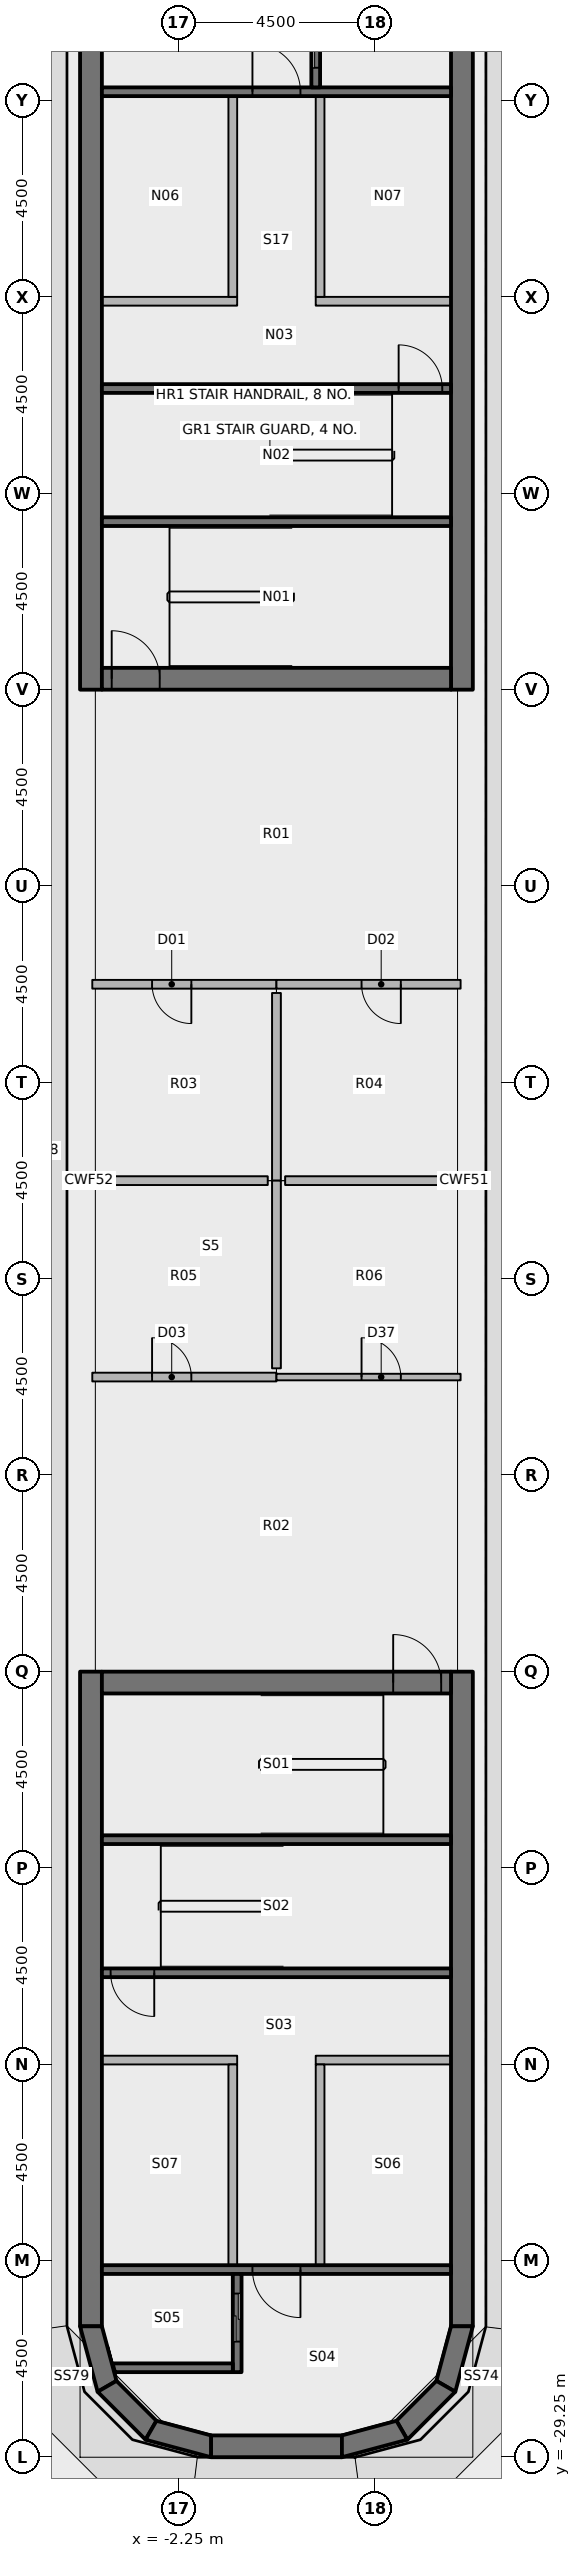
"""IFC4 building model, lengths in metres.
Left out: names, types, materials, properties, quantities, classifications, styles, units other than length and angle.
Written with IfcOpenShell. Run it as: python <this file> out.ifc"""

import sys

from ifc_helpers import new_model, si_unit, direction, frame, frame_2d, origin, place, context, subcontext, project, spatial, polyline, rectangle, outline, extrude, element, fill, save


model = new_model("IFC4")
c1 = context("Model", 3, precision=1e-05, world=origin(), true_north=direction((0.0, 1.0)))
c2 = subcontext(c1, "Body", "Model", "MODEL_VIEW")
j1 = project(units=[si_unit("LENGTHUNIT", "METRE"), si_unit("PLANEANGLEUNIT", "RADIAN")], contexts=[c1])
p1 = place(None, origin())
s1 = spatial("IfcSite", under=j1, at=p1, CompositionType="ELEMENT")
p2 = place(p1, origin())
s2 = spatial("IfcBuilding", under=s1, at=p2, CompositionType="ELEMENT")
p3 = place(p2, frame((0.0, 0.0, 313.2)))
s3 = spatial("IfcBuildingStorey", under=s2, at=p3, CompositionType="ELEMENT", Elevation=313.2)
for number, where, z_axis, x_axis in (
    (1, (-4.25, 11.25, 0.0), (0.0, 0.0, 1.0), (0.0, 1.0, 0.0)),
    (2, (4.25, 11.25, 0.0), (0.0, 0.0, 1.0), (0.0, 1.0, 0.0)),
):
    element("IfcWall", number, at=place(p3, frame(where, z_axis=z_axis, x_axis=x_axis)), inside=s3, PredefinedType="SHEAR", context=c2, shape_type="SweptSolid", body=[
        extrude(rectangle(XDim=15.0, YDim=0.5, at=frame_2d((7.5, 0.0))), origin(), (0.0, 0.0, 1.0), 3.6),
    ])
p4 = place(p3, frame((-4.0, 11.5, 0.0), z_axis=(0.0, 0.0, 1.0), x_axis=(1.0, 0.0, 0.0)))
e3 = element("IfcWall", 3, at=p4, inside=s3, PredefinedType="SHEAR", context=c2, shape_type="SweptSolid", body=[
    extrude(rectangle(XDim=8.0, YDim=0.5, at=frame_2d((4.0, 0.0))), origin(), (0.0, 0.0, 1.0), 3.6),
])
p5 = place(p4, frame((0.225, 0.0, 0.0)))
e4 = element("IfcOpeningElement", 4, at=p5, cuts=e3, PredefinedType="OPENING", context=c2, shape_type="SweptSolid", body=[
    extrude(rectangle(XDim=1.1, YDim=2.1, at=frame_2d((0.55, 1.05))), frame((0.0, 0.26, 0.0), z_axis=(0.0, -1.0, 0.0), x_axis=(1.0, 0.0, 0.0)), (0.0, 0.0, 1.0), 0.52),
])
for number, where, z_axis, x_axis in (
    (5, (-4.25, -11.25, 0.0), (0.0, 0.0, 1.0), (0.0, -1.0, 0.0)),
    (6, (4.25, -11.25, 0.0), (0.0, 0.0, 1.0), (0.0, -1.0, 0.0)),
):
    element("IfcWall", number, at=place(p3, frame(where, z_axis=z_axis, x_axis=x_axis)), inside=s3, PredefinedType="SHEAR", context=c2, shape_type="SweptSolid", body=[
        extrude(rectangle(XDim=15.0, YDim=0.5, at=frame_2d((7.5, 0.0))), origin(), (0.0, 0.0, 1.0), 3.6),
    ])
p6 = place(p3, frame((-4.0, -11.5, 0.0), z_axis=(0.0, 0.0, 1.0), x_axis=(1.0, 0.0, 0.0)))
e7 = element("IfcWall", 7, at=p6, inside=s3, PredefinedType="SHEAR", context=c2, shape_type="SweptSolid", body=[
    extrude(rectangle(XDim=8.0, YDim=0.5, at=frame_2d((4.0, 0.0))), origin(), (0.0, 0.0, 1.0), 3.6),
])
p7 = place(p6, frame((6.675, 0.0, 0.0)))
e8 = element("IfcOpeningElement", 8, at=p7, cuts=e7, PredefinedType="OPENING", context=c2, shape_type="SweptSolid", body=[
    extrude(rectangle(XDim=1.1, YDim=2.1, at=frame_2d((0.55, 1.05))), frame((0.0, 0.26, 0.0), z_axis=(0.0, -1.0, 0.0), x_axis=(1.0, 0.0, 0.0)), (0.0, 0.0, 1.0), 0.52),
])
p8 = place(p3, frame((-1.5, -29.0, 0.0), z_axis=(0.0, 0.0, 1.0), x_axis=(1.0, 0.0, 0.0)))
e9 = element("IfcWall", 9, at=p8, inside=s3, PredefinedType="SHEAR", context=c2, shape_type="SweptSolid", body=[
    extrude(rectangle(XDim=3.0, YDim=0.5, at=frame_2d((1.5, 0.0))), origin(), (0.0, 0.0, 1.0), 3.6),
])
p9 = place(p3, origin())
e10 = element("IfcWall", 10, at=p9, inside=s3, PredefinedType="SHEAR", context=c2, shape_type="SweptSolid", body=[
    extrude(outline(polyline([(-4.5, -26.25), (-4.098, -27.75), (-3.665, -27.5), (-4.0, -26.25), (-4.5, -26.25)])), origin(), (0.0, 0.0, 1.0), 3.6),
])
p10 = place(p3, origin())
e11 = element("IfcWall", 11, at=p10, inside=s3, PredefinedType="SHEAR", context=c2, shape_type="SweptSolid", body=[
    extrude(outline(polyline([(-4.098, -27.75), (-3.0, -28.848), (-2.75, -28.415), (-3.665, -27.5), (-4.098, -27.75)])), origin(), (0.0, 0.0, 1.0), 3.6),
])
p11 = place(p3, origin())
e12 = element("IfcWall", 12, at=p11, inside=s3, PredefinedType="SHEAR", context=c2, shape_type="SweptSolid", body=[
    extrude(outline(polyline([(-3.0, -28.848), (-1.5, -29.25), (-1.5, -28.75), (-2.75, -28.415), (-3.0, -28.848)])), origin(), (0.0, 0.0, 1.0), 3.6),
])
p12 = place(p3, origin())
e13 = element("IfcWall", 13, at=p12, inside=s3, PredefinedType="SHEAR", context=c2, shape_type="SweptSolid", body=[
    extrude(outline(polyline([(4.5, -26.25), (4.098, -27.75), (3.665, -27.5), (4.0, -26.25), (4.5, -26.25)])), origin(), (0.0, 0.0, 1.0), 3.6),
])
p13 = place(p3, origin())
e14 = element("IfcWall", 14, at=p13, inside=s3, PredefinedType="SHEAR", context=c2, shape_type="SweptSolid", body=[
    extrude(outline(polyline([(4.098, -27.75), (3.0, -28.848), (2.75, -28.415), (3.665, -27.5), (4.098, -27.75)])), origin(), (0.0, 0.0, 1.0), 3.6),
])
p14 = place(p3, origin())
e15 = element("IfcWall", 15, at=p14, inside=s3, PredefinedType="SHEAR", context=c2, shape_type="SweptSolid", body=[
    extrude(outline(polyline([(3.0, -28.848), (1.5, -29.25), (1.5, -28.75), (2.75, -28.415), (3.0, -28.848)])), origin(), (0.0, 0.0, 1.0), 3.6),
])
p15 = place(p3, frame((-4.0, 24.95, 0.0), z_axis=(0.0, 0.0, 1.0), x_axis=(1.0, 0.0, 0.0)))
e16 = element("IfcWall", 16, at=p15, inside=s3, PredefinedType="SHEAR", context=c2, shape_type="SweptSolid", body=[
    extrude(rectangle(XDim=8.0, YDim=0.2, at=frame_2d((4.0, 0.0))), origin(), (0.0, 0.0, 1.0), 3.45),
])
p16 = place(p15, frame((3.45, 0.0, 0.0)))
e17 = element("IfcOpeningElement", 17, at=p16, cuts=e16, PredefinedType="OPENING", context=c2, shape_type="SweptSolid", body=[
    extrude(rectangle(XDim=1.1, YDim=2.1, at=frame_2d((0.55, 1.05))), frame((0.0, 0.11, 0.0), z_axis=(0.0, -1.0, 0.0), x_axis=(1.0, 0.0, 0.0)), (0.0, 0.0, 1.0), 0.22),
])
p17 = place(p3, frame((0.9, 27.3, 0.0), z_axis=(0.0, 0.0, 1.0), x_axis=(0.0, -1.0, 0.0)))
e18 = element("IfcWall", 18, at=p17, inside=s3, PredefinedType="SHEAR", context=c2, shape_type="SweptSolid", body=[
    extrude(rectangle(XDim=2.25, YDim=0.2, at=frame_2d((1.125, 0.0))), origin(), (0.0, 0.0, 1.0), 3.45),
])
p18 = place(p17, frame((0.7, 0.0, 0.0)))
e19 = element("IfcOpeningElement", 19, at=p18, cuts=e18, PredefinedType="OPENING", context=c2, shape_type="SweptSolid", body=[
    extrude(rectangle(XDim=1.1, YDim=2.3, at=frame_2d((0.55, 1.15))), frame((0.0, 0.11, 0.0), z_axis=(0.0, -1.0, 0.0), x_axis=(1.0, 0.0, 0.0)), (0.0, 0.0, 1.0), 0.22),
])
p19 = place(p3, frame((-4.0, 18.15, 0.0), z_axis=(0.0, 0.0, 1.0), x_axis=(1.0, 0.0, 0.0)))
e20 = element("IfcWall", 20, at=p19, inside=s3, PredefinedType="SHEAR", context=c2, shape_type="SweptSolid", body=[
    extrude(rectangle(XDim=8.0, YDim=0.2, at=frame_2d((4.0, 0.0))), origin(), (0.0, 0.0, 1.0), 3.45),
])
p20 = place(p19, frame((6.8, 0.0, 0.0)))
e21 = element("IfcOpeningElement", 21, at=p20, cuts=e20, PredefinedType="OPENING", context=c2, shape_type="SweptSolid", body=[
    extrude(rectangle(XDim=1.0, YDim=2.1, at=frame_2d((0.5, 1.05))), frame((0.0, 0.11, 0.0), z_axis=(0.0, -1.0, 0.0), x_axis=(1.0, 0.0, 0.0)), (0.0, 0.0, 1.0), 0.22),
])
p21 = place(p3, frame((-4.0, 15.1, 0.0), z_axis=(0.0, 0.0, 1.0), x_axis=(1.0, 0.0, 0.0)))
e22 = element("IfcWall", 22, at=p21, inside=s3, PredefinedType="SHEAR", context=c2, shape_type="SweptSolid", body=[
    extrude(rectangle(XDim=8.0, YDim=0.2, at=frame_2d((4.0, 0.0))), origin(), (0.0, 0.0, 1.0), 3.45),
])
p22 = place(p3, frame((-4.0, 20.15, 0.0), z_axis=(0.0, 0.0, 1.0), x_axis=(1.0, 0.0, 0.0)))
e23 = element("IfcWall", 23, at=p22, inside=s3, PredefinedType="PARTITIONING", context=c2, shape_type="SweptSolid", body=[
    extrude(rectangle(XDim=3.1, YDim=0.2, at=frame_2d((1.55, 0.0))), origin(), (0.0, 0.0, 1.0), 3.45),
])
p23 = place(p3, frame((-1.0, 24.85, 0.0), z_axis=(0.0, 0.0, 1.0), x_axis=(0.0, -1.0, 0.0)))
e24 = element("IfcWall", 24, at=p23, inside=s3, PredefinedType="PARTITIONING", context=c2, shape_type="SweptSolid", body=[
    extrude(rectangle(XDim=4.6, YDim=0.2, at=frame_2d((2.3, 0.0))), origin(), (0.0, 0.0, 1.0), 3.45),
])
p24 = place(p3, frame((0.9, 20.15, 0.0), z_axis=(0.0, 0.0, 1.0), x_axis=(1.0, 0.0, 0.0)))
e25 = element("IfcWall", 25, at=p24, inside=s3, PredefinedType="PARTITIONING", context=c2, shape_type="SweptSolid", body=[
    extrude(rectangle(XDim=3.1, YDim=0.2, at=frame_2d((1.55, 0.0))), origin(), (0.0, 0.0, 1.0), 3.45),
])
p25 = place(p3, frame((1.0, 24.85, 0.0), z_axis=(0.0, 0.0, 1.0), x_axis=(0.0, -1.0, 0.0)))
e26 = element("IfcWall", 26, at=p25, inside=s3, PredefinedType="PARTITIONING", context=c2, shape_type="SweptSolid", body=[
    extrude(rectangle(XDim=4.6, YDim=0.2, at=frame_2d((2.3, 0.0))), origin(), (0.0, 0.0, 1.0), 3.45),
])
p26 = place(p3, frame((4.0, -24.95, 0.0), z_axis=(0.0, 0.0, 1.0), x_axis=(-1.0, 0.0, 0.0)))
e27 = element("IfcWall", 27, at=p26, inside=s3, PredefinedType="SHEAR", context=c2, shape_type="SweptSolid", body=[
    extrude(rectangle(XDim=8.0, YDim=0.2, at=frame_2d((4.0, 0.0))), origin(), (0.0, 0.0, 1.0), 3.45),
])
p27 = place(p26, frame((3.45, 0.0, 0.0)))
e28 = element("IfcOpeningElement", 28, at=p27, cuts=e27, PredefinedType="OPENING", context=c2, shape_type="SweptSolid", body=[
    extrude(rectangle(XDim=1.1, YDim=2.1, at=frame_2d((0.55, 1.05))), frame((0.0, 0.11, 0.0), z_axis=(0.0, -1.0, 0.0), x_axis=(1.0, 0.0, 0.0)), (0.0, 0.0, 1.0), 0.22),
])
p28 = place(p3, frame((-0.9, -27.3, 0.0), z_axis=(0.0, 0.0, 1.0), x_axis=(0.0, 1.0, 0.0)))
e29 = element("IfcWall", 29, at=p28, inside=s3, PredefinedType="SHEAR", context=c2, shape_type="SweptSolid", body=[
    extrude(rectangle(XDim=2.25, YDim=0.2, at=frame_2d((1.125, 0.0))), origin(), (0.0, 0.0, 1.0), 3.45),
])
p29 = place(p28, frame((0.7, 0.0, 0.0)))
e30 = element("IfcOpeningElement", 30, at=p29, cuts=e29, PredefinedType="OPENING", context=c2, shape_type="SweptSolid", body=[
    extrude(rectangle(XDim=1.1, YDim=2.3, at=frame_2d((0.55, 1.15))), frame((0.0, 0.11, 0.0), z_axis=(0.0, -1.0, 0.0), x_axis=(1.0, 0.0, 0.0)), (0.0, 0.0, 1.0), 0.22),
])
p30 = place(p3, origin())
e31 = element("IfcWall", 31, at=p30, inside=s3, PredefinedType="SHEAR", context=c2, shape_type="SweptSolid", body=[
    extrude(outline(polyline([(-1.0, -27.1), (-3.755, -27.1), (-3.701, -27.3), (-1.0, -27.3), (-1.0, -27.1)])), origin(), (0.0, 0.0, 1.0), 3.45),
])
p31 = place(p3, frame((4.0, -18.15, 0.0), z_axis=(0.0, 0.0, 1.0), x_axis=(-1.0, 0.0, 0.0)))
e32 = element("IfcWall", 32, at=p31, inside=s3, PredefinedType="SHEAR", context=c2, shape_type="SweptSolid", body=[
    extrude(rectangle(XDim=8.0, YDim=0.2, at=frame_2d((4.0, 0.0))), origin(), (0.0, 0.0, 1.0), 3.45),
])
p32 = place(p31, frame((6.8, 0.0, 0.0)))
e33 = element("IfcOpeningElement", 33, at=p32, cuts=e32, PredefinedType="OPENING", context=c2, shape_type="SweptSolid", body=[
    extrude(rectangle(XDim=1.0, YDim=2.1, at=frame_2d((0.5, 1.05))), frame((0.0, 0.11, 0.0), z_axis=(0.0, -1.0, 0.0), x_axis=(1.0, 0.0, 0.0)), (0.0, 0.0, 1.0), 0.22),
])
p33 = place(p3, frame((4.0, -15.1, 0.0), z_axis=(0.0, 0.0, 1.0), x_axis=(-1.0, 0.0, 0.0)))
e34 = element("IfcWall", 34, at=p33, inside=s3, PredefinedType="SHEAR", context=c2, shape_type="SweptSolid", body=[
    extrude(rectangle(XDim=8.0, YDim=0.2, at=frame_2d((4.0, 0.0))), origin(), (0.0, 0.0, 1.0), 3.45),
])
p34 = place(p3, frame((4.0, -20.15, 0.0), z_axis=(0.0, 0.0, 1.0), x_axis=(-1.0, 0.0, 0.0)))
e35 = element("IfcWall", 35, at=p34, inside=s3, PredefinedType="PARTITIONING", context=c2, shape_type="SweptSolid", body=[
    extrude(rectangle(XDim=3.1, YDim=0.2, at=frame_2d((1.55, 0.0))), origin(), (0.0, 0.0, 1.0), 3.45),
])
p35 = place(p3, frame((1.0, -24.85, 0.0), z_axis=(0.0, 0.0, 1.0), x_axis=(0.0, 1.0, 0.0)))
e36 = element("IfcWall", 36, at=p35, inside=s3, PredefinedType="PARTITIONING", context=c2, shape_type="SweptSolid", body=[
    extrude(rectangle(XDim=4.6, YDim=0.2, at=frame_2d((2.3, 0.0))), origin(), (0.0, 0.0, 1.0), 3.45),
])
p36 = place(p3, frame((-0.9, -20.15, 0.0), z_axis=(0.0, 0.0, 1.0), x_axis=(-1.0, 0.0, 0.0)))
e37 = element("IfcWall", 37, at=p36, inside=s3, PredefinedType="PARTITIONING", context=c2, shape_type="SweptSolid", body=[
    extrude(rectangle(XDim=3.1, YDim=0.2, at=frame_2d((1.55, 0.0))), origin(), (0.0, 0.0, 1.0), 3.45),
])
p37 = place(p3, frame((-1.0, -24.85, 0.0), z_axis=(0.0, 0.0, 1.0), x_axis=(0.0, 1.0, 0.0)))
e38 = element("IfcWall", 38, at=p37, inside=s3, PredefinedType="PARTITIONING", context=c2, shape_type="SweptSolid", body=[
    extrude(rectangle(XDim=4.6, YDim=0.2, at=frame_2d((2.3, 0.0))), origin(), (0.0, 0.0, 1.0), 3.45),
])
p38 = place(p3, frame((0.0, 4.5, 0.0), z_axis=(0.0, 0.0, 1.0), x_axis=(-1.0, 0.0, 0.0)))
e39 = element("IfcWall", 39, at=p38, inside=s3, PredefinedType="PARTITIONING", context=c2, shape_type="SweptSolid", body=[
    extrude(rectangle(XDim=4.22, YDim=0.2, at=frame_2d((2.11, 0.0))), origin(), (0.0, 0.0, 1.0), 2.511),
])
p39 = place(p38, frame((1.95, 0.0, 0.0)))
e40 = element("IfcOpeningElement", 40, at=p39, cuts=e39, PredefinedType="OPENING", context=c2, shape_type="SweptSolid", body=[
    extrude(rectangle(XDim=0.9, YDim=2.1, at=frame_2d((0.45, 1.05))), frame((0.0, 0.11, 0.0), z_axis=(0.0, -1.0, 0.0), x_axis=(1.0, 0.0, 0.0)), (0.0, 0.0, 1.0), 0.22),
])
p40 = place(p3, frame((4.22, 4.5, 0.0), z_axis=(0.0, 0.0, 1.0), x_axis=(-1.0, 0.0, 0.0)))
e41 = element("IfcWall", 41, at=p40, inside=s3, PredefinedType="PARTITIONING", context=c2, shape_type="SweptSolid", body=[
    extrude(rectangle(XDim=4.22, YDim=0.2, at=frame_2d((2.11, 0.0))), origin(), (0.0, 0.0, 1.0), 2.511),
])
p41 = place(p40, frame((1.37, 0.0, 0.0)))
e42 = element("IfcOpeningElement", 42, at=p41, cuts=e41, PredefinedType="OPENING", context=c2, shape_type="SweptSolid", body=[
    extrude(rectangle(XDim=0.9, YDim=2.1, at=frame_2d((0.45, 1.05))), frame((0.0, 0.11, 0.0), z_axis=(0.0, -1.0, 0.0), x_axis=(1.0, 0.0, 0.0)), (0.0, 0.0, 1.0), 0.22),
])
p42 = place(p3, frame((-4.22, -4.5, 0.0), z_axis=(0.0, 0.0, 1.0), x_axis=(1.0, 0.0, 0.0)))
e43 = element("IfcWall", 43, at=p42, inside=s3, PredefinedType="PARTITIONING", context=c2, shape_type="SweptSolid", body=[
    extrude(rectangle(XDim=4.22, YDim=0.2, at=frame_2d((2.11, 0.0))), origin(), (0.0, 0.0, 1.0), 2.511),
])
p43 = place(p42, frame((1.37, 0.0, 0.0)))
e44 = element("IfcOpeningElement", 44, at=p43, cuts=e43, PredefinedType="OPENING", context=c2, shape_type="SweptSolid", body=[
    extrude(rectangle(XDim=0.9, YDim=2.1, at=frame_2d((0.45, 1.05))), frame((0.0, 0.11, 0.0), z_axis=(0.0, -1.0, 0.0), x_axis=(1.0, 0.0, 0.0)), (0.0, 0.0, 1.0), 0.22),
])
p44 = place(p3, frame((0.0, -4.5, 0.0), z_axis=(0.0, 0.0, 1.0), x_axis=(1.0, 0.0, 0.0)))
e45 = element("IfcWall", 45, at=p44, inside=s3, PredefinedType="PARTITIONING", context=c2, shape_type="SweptSolid", body=[
    extrude(rectangle(XDim=4.22, YDim=0.15, at=frame_2d((2.11, 0.0))), origin(), (0.0, 0.0, 1.0), 2.511),
])
p45 = place(p44, frame((1.95, 0.0, 0.0)))
e46 = element("IfcOpeningElement", 46, at=p45, cuts=e45, PredefinedType="OPENING", context=c2, shape_type="SweptSolid", body=[
    extrude(rectangle(XDim=0.9, YDim=2.1, at=frame_2d((0.45, 1.05))), frame((0.0, 0.085, 0.0), z_axis=(0.0, -1.0, 0.0), x_axis=(1.0, 0.0, 0.0)), (0.0, 0.0, 1.0), 0.17),
])
p46 = place(p3, frame((0.0, 4.3, 0.0), z_axis=(0.0, 0.0, 1.0), x_axis=(0.0, -1.0, 0.0)))
e47 = element("IfcWall", 47, at=p46, inside=s3, PredefinedType="PARTITIONING", context=c2, shape_type="SweptSolid", body=[
    extrude(rectangle(XDim=4.3, YDim=0.2, at=frame_2d((2.15, 0.0))), origin(), (0.0, 0.0, 1.0), 2.828),
])
for number, where, z_axis, x_axis in (
    (48, (-0.2, 0.0, 0.0), (0.0, 0.0, 1.0), (-1.0, 0.0, 0.0)),
    (49, (4.22, 0.0, 0.0), (0.0, 0.0, 1.0), (-1.0, 0.0, 0.0)),
):
    element("IfcWall", number, at=place(p3, frame(where, z_axis=z_axis, x_axis=x_axis)), inside=s3, PredefinedType="PARTITIONING", context=c2, shape_type="SweptSolid", body=[
        extrude(rectangle(XDim=4.02, YDim=0.2, at=frame_2d((2.01, 0.0))), origin(), (0.0, 0.0, 1.0), 2.511),
    ])
p47 = place(p3, frame((0.0, 0.0, 0.0), z_axis=(0.0, 0.0, 1.0), x_axis=(0.0, -1.0, 0.0)))
e50 = element("IfcWall", 50, at=p47, inside=s3, PredefinedType="PARTITIONING", context=c2, shape_type="SweptSolid", body=[
    extrude(rectangle(XDim=4.3, YDim=0.2, at=frame_2d((2.15, 0.0))), origin(), (0.0, 0.0, 1.0), 2.828),
])
p48 = place(p16, origin())
e51 = element("IfcDoor", 51, at=p48, inside=s3, OperationType="SINGLE_SWING_LEFT", PredefinedType="DOOR", context=c2, shape_type="SweptSolid", body=[
    extrude(rectangle(XDim=1.1, YDim=2.1, at=frame_2d((0.55, 1.05))), frame((0.0, 0.025, 0.0), z_axis=(0.0, -1.0, 0.0), x_axis=(1.0, 0.0, 0.0)), (0.0, 0.0, 1.0), 0.05),
])
fill(e17, e51)
p49 = place(p20, origin())
e52 = element("IfcDoor", 52, at=p49, inside=s3, OperationType="SINGLE_SWING_RIGHT", PredefinedType="DOOR", context=c2, shape_type="SweptSolid", body=[
    extrude(rectangle(XDim=1.0, YDim=2.1, at=frame_2d((0.5, 1.05))), frame((0.0, 0.025, 0.0), z_axis=(0.0, -1.0, 0.0), x_axis=(1.0, 0.0, 0.0)), (0.0, 0.0, 1.0), 0.05),
])
fill(e21, e52)
p50 = place(p5, origin())
e53 = element("IfcDoor", 53, at=p50, inside=s3, OperationType="SINGLE_SWING_LEFT", PredefinedType="DOOR", context=c2, shape_type="SweptSolid", body=[
    extrude(rectangle(XDim=1.1, YDim=2.1, at=frame_2d((0.55, 1.05))), frame((0.0, 0.025, 0.0), z_axis=(0.0, -1.0, 0.0), x_axis=(1.0, 0.0, 0.0)), (0.0, 0.0, 1.0), 0.05),
])
fill(e4, e53)
p51 = place(p18, origin())
e54 = element("IfcDoor", 54, at=p51, inside=s3, OperationType="DOUBLE_DOOR_SLIDING", PredefinedType="DOOR", context=c2, shape_type="SweptSolid", body=[
    extrude(rectangle(XDim=1.1, YDim=2.3, at=frame_2d((0.55, 1.15))), frame((0.0, 0.025, 0.0), z_axis=(0.0, -1.0, 0.0), x_axis=(1.0, 0.0, 0.0)), (0.0, 0.0, 1.0), 0.05),
])
fill(e19, e54)
p52 = place(p27, origin())
e55 = element("IfcDoor", 55, at=p52, inside=s3, OperationType="SINGLE_SWING_LEFT", PredefinedType="DOOR", context=c2, shape_type="SweptSolid", body=[
    extrude(rectangle(XDim=1.1, YDim=2.1, at=frame_2d((0.55, 1.05))), frame((0.0, 0.025, 0.0), z_axis=(0.0, -1.0, 0.0), x_axis=(1.0, 0.0, 0.0)), (0.0, 0.0, 1.0), 0.05),
])
fill(e28, e55)
p53 = place(p32, origin())
e56 = element("IfcDoor", 56, at=p53, inside=s3, OperationType="SINGLE_SWING_LEFT", PredefinedType="DOOR", context=c2, shape_type="SweptSolid", body=[
    extrude(rectangle(XDim=1.0, YDim=2.1, at=frame_2d((0.5, 1.05))), frame((0.0, 0.025, 0.0), z_axis=(0.0, -1.0, 0.0), x_axis=(1.0, 0.0, 0.0)), (0.0, 0.0, 1.0), 0.05),
])
fill(e33, e56)
p54 = place(p7, origin())
e57 = element("IfcDoor", 57, at=p54, inside=s3, OperationType="SINGLE_SWING_LEFT", PredefinedType="DOOR", context=c2, shape_type="SweptSolid", body=[
    extrude(rectangle(XDim=1.1, YDim=2.1, at=frame_2d((0.55, 1.05))), frame((0.0, 0.025, 0.0), z_axis=(0.0, -1.0, 0.0), x_axis=(1.0, 0.0, 0.0)), (0.0, 0.0, 1.0), 0.05),
])
fill(e8, e57)
p55 = place(p29, origin())
e58 = element("IfcDoor", 58, at=p55, inside=s3, OperationType="DOUBLE_DOOR_SLIDING", PredefinedType="DOOR", context=c2, shape_type="SweptSolid", body=[
    extrude(rectangle(XDim=1.1, YDim=2.3, at=frame_2d((0.55, 1.15))), frame((0.0, 0.025, 0.0), z_axis=(0.0, -1.0, 0.0), x_axis=(1.0, 0.0, 0.0)), (0.0, 0.0, 1.0), 0.05),
])
fill(e30, e58)
p56 = place(p39, origin())
e59 = element("IfcDoor", 59, at=p56, inside=s3, OperationType="SINGLE_SWING_LEFT", PredefinedType="DOOR", context=c2, shape_type="SweptSolid", body=[
    extrude(rectangle(XDim=0.9, YDim=2.1, at=frame_2d((0.45, 1.05))), frame((0.0, 0.025, 0.0), z_axis=(0.0, -1.0, 0.0), x_axis=(1.0, 0.0, 0.0)), (0.0, 0.0, 1.0), 0.05),
])
fill(e40, e59)
p57 = place(p41, origin())
e60 = element("IfcDoor", 60, at=p57, inside=s3, OperationType="SINGLE_SWING_LEFT", PredefinedType="DOOR", context=c2, shape_type="SweptSolid", body=[
    extrude(rectangle(XDim=0.9, YDim=2.1, at=frame_2d((0.45, 1.05))), frame((0.0, 0.025, 0.0), z_axis=(0.0, -1.0, 0.0), x_axis=(1.0, 0.0, 0.0)), (0.0, 0.0, 1.0), 0.05),
])
fill(e42, e60)
p58 = place(p43, origin())
e61 = element("IfcDoor", 61, at=p58, inside=s3, OperationType="SINGLE_SWING_LEFT", PredefinedType="DOOR", context=c2, shape_type="SweptSolid", body=[
    extrude(rectangle(XDim=0.9, YDim=2.1, at=frame_2d((0.45, 1.05))), frame((0.0, 0.025, 0.0), z_axis=(0.0, -1.0, 0.0), x_axis=(1.0, 0.0, 0.0)), (0.0, 0.0, 1.0), 0.05),
])
fill(e44, e61)
p59 = place(p45, origin())
e62 = element("IfcDoor", 62, at=p59, inside=s3, OperationType="SINGLE_SWING_LEFT", PredefinedType="DOOR", context=c2, shape_type="SweptSolid", body=[
    extrude(rectangle(XDim=0.9, YDim=2.1, at=frame_2d((0.45, 1.05))), frame((0.0, 0.025, 0.0), z_axis=(0.0, -1.0, 0.0), x_axis=(1.0, 0.0, 0.0)), (0.0, 0.0, 1.0), 0.05),
])
fill(e46, e62)
save(model, sys.argv[1])
